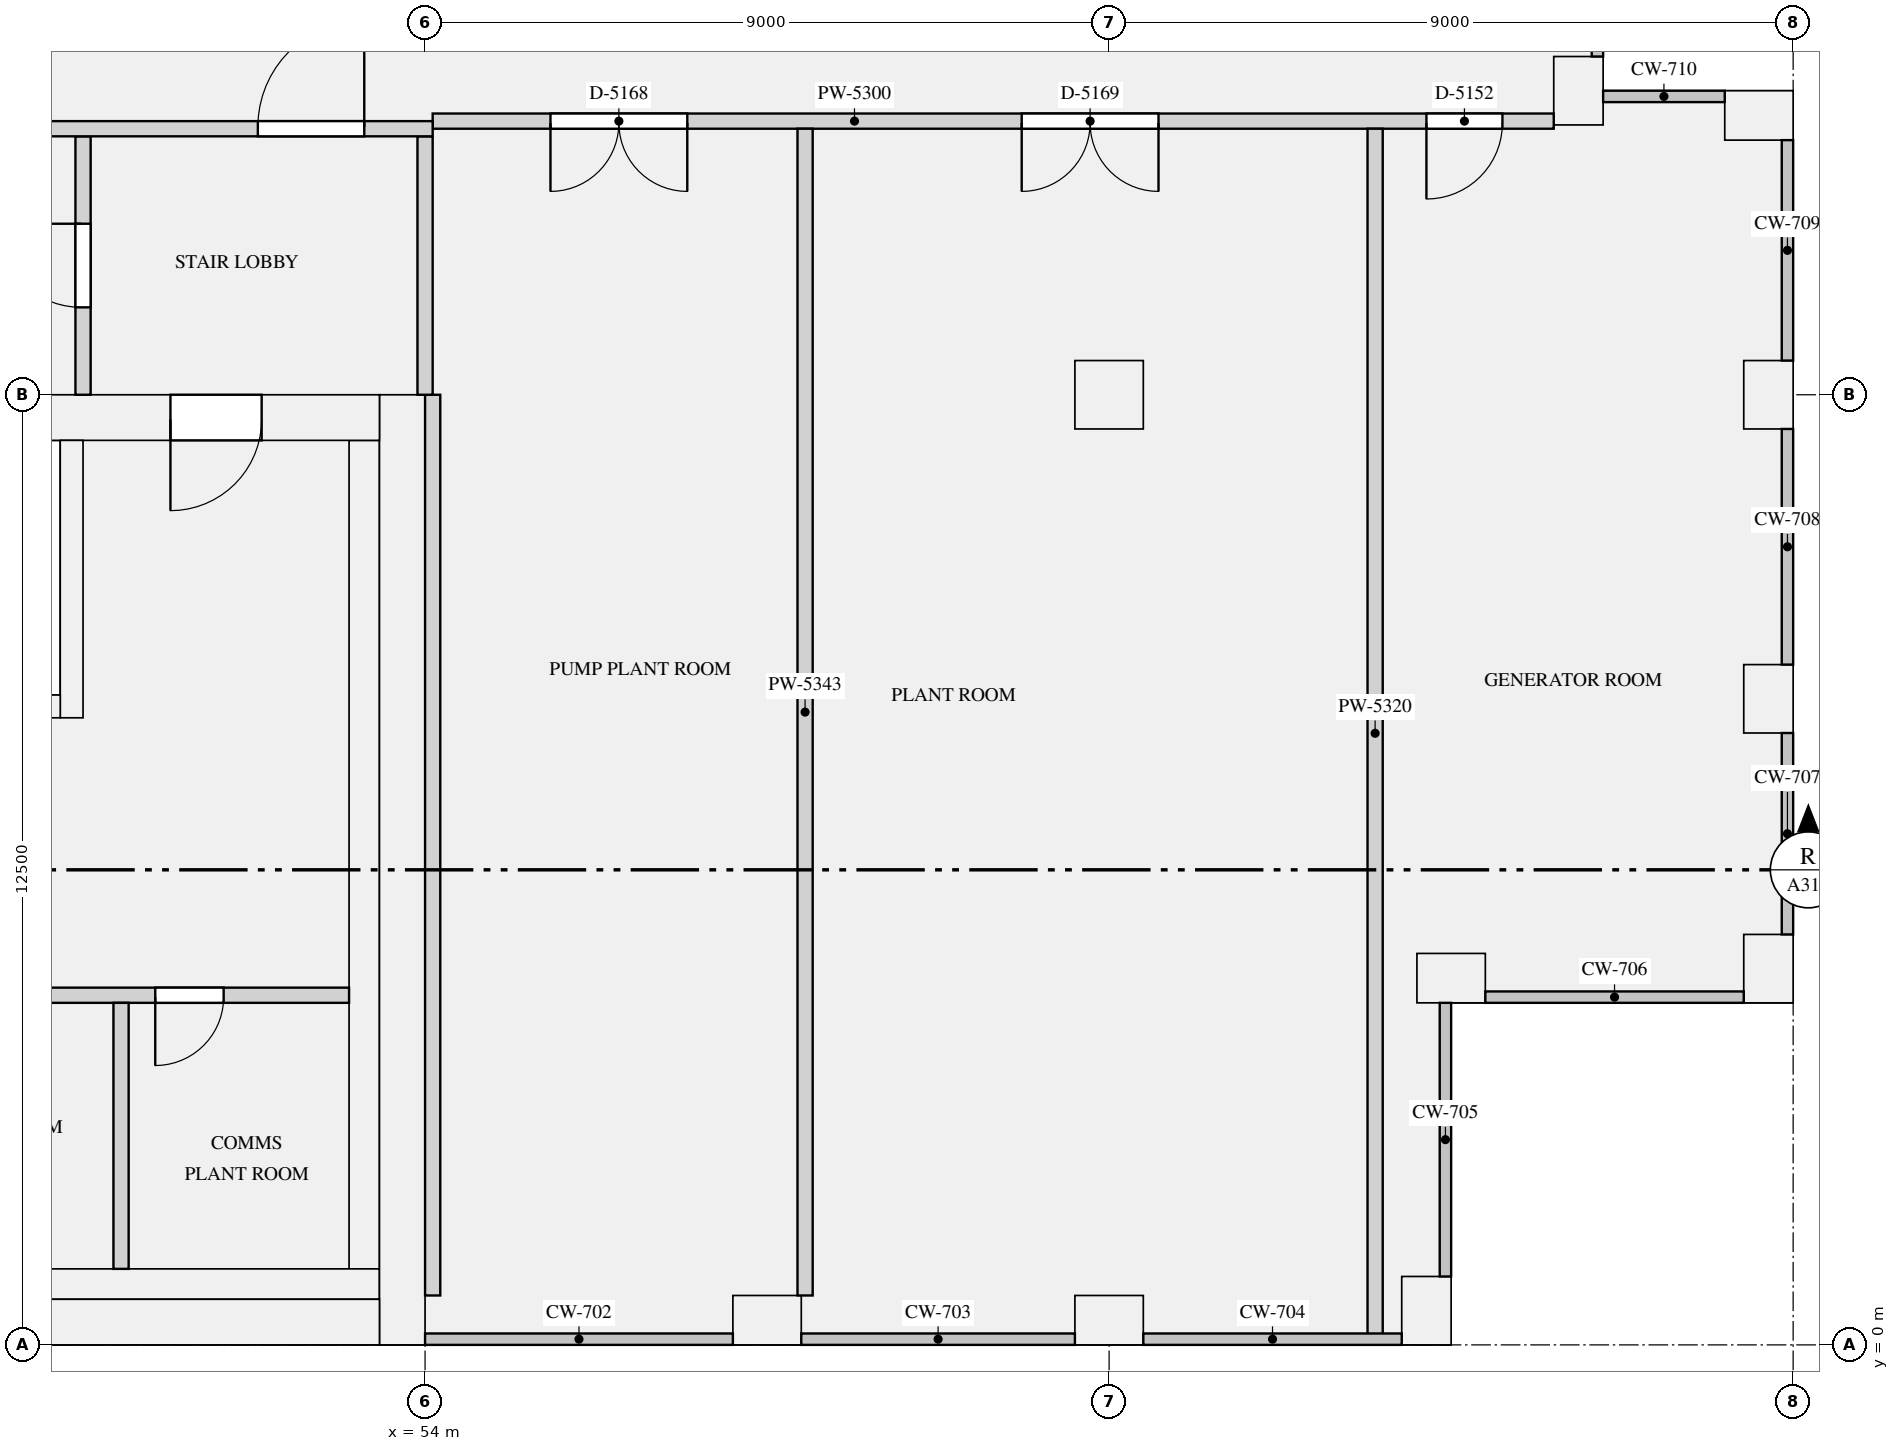
"""IFC4 building model, lengths in metres.
Left out: names, types, materials, properties, quantities, classifications, styles, units other than length and angle.
Written with IfcOpenShell. Run it as: python <this file> out.ifc"""

import sys

from ifc_helpers import new_model, si_unit, direction, frame, frame_2d, origin, origin_2d, place, context, subcontext, project, spatial, rectangle, extrude, element, fill, save


model = new_model("IFC4")
c1 = context("Model", 3, precision=1e-05, world=origin(), true_north=direction((0.0, 1.0)))
c2 = subcontext(c1, "Body", "Model", "MODEL_VIEW")
j1 = project(units=[si_unit("LENGTHUNIT", "METRE"), si_unit("PLANEANGLEUNIT", "RADIAN")], contexts=[c1])
p1 = place(None, origin())
s1 = spatial("IfcSite", under=j1, at=p1, CompositionType="ELEMENT")
p2 = place(p1, origin())
s2 = spatial("IfcBuilding", under=s1, at=p2, CompositionType="ELEMENT")
p3 = place(p2, frame((0.0, 0.0, 240.0)))
s3 = spatial("IfcBuildingStorey", under=s2, at=p3, CompositionType="ELEMENT", Elevation=240.0)
for number, where, z_axis, x_axis in (
    (1, (58.5, 0.325, 0.0), (0.0, 0.0, 1.0), (1.0, 0.0, 0.0)),
    (2, (63.0, 0.325, 0.0), (0.0, 0.0, 1.0), (1.0, 0.0, 0.0)),
    (3, (67.175, 0.45, 0.0), (0.0, 0.0, 1.0), (0.0, 1.0, 0.0)),
    (4, (67.5, 4.825, 0.0), (0.0, 0.0, 1.0), (1.0, 0.0, 0.0)),
    (5, (71.675, 4.95, 0.0), (0.0, 0.0, 1.0), (0.0, 1.0, 0.0)),
    (6, (71.675, 8.5, 0.0), (0.0, 0.0, 1.0), (0.0, 1.0, 0.0)),
    (7, (71.675, 12.5, 0.0), (0.0, 0.0, 1.0), (0.0, 1.0, 0.0)),
    (8, (71.55, 16.175, 0.0), (0.0, 0.0, 1.0), (-1.0, 0.0, 0.0)),
    (9, (69.175, 16.5, 0.0), (0.0, 0.0, 1.0), (0.0, 1.0, 0.0)),
):
    element("IfcColumn", number, at=place(p3, frame(where, z_axis=z_axis, x_axis=x_axis)), inside=s3, PredefinedType="USERDEFINED", context=c2, shape_type="SweptSolid", body=[
        extrude(rectangle(XDim=0.9, YDim=0.65, at=origin_2d()), origin(), (0.0, 0.0, 1.0), 4.2),
    ])
p4 = place(p3, frame((63.0, 12.5, 0.0), z_axis=(0.0, 0.0, 1.0), x_axis=(1.0, 0.0, 0.0)))
e10 = element("IfcColumn", 10, at=p4, inside=s3, PredefinedType="COLUMN", context=c2, shape_type="SweptSolid", body=[
    extrude(rectangle(XDim=0.9, YDim=0.9, at=origin_2d()), origin(), (0.0, 0.0, 1.0), 4.2),
])
p5 = place(p3, frame((53.7, 0.0, 0.0), z_axis=(0.0, 0.0, 1.0), x_axis=(0.0, 1.0, 0.0)))
e11 = element("IfcWall", 11, at=p5, inside=s3, PredefinedType="SHEAR", context=c2, shape_type="SweptSolid", body=[
    extrude(rectangle(XDim=12.5, YDim=0.6, at=frame_2d((6.25, 0.0))), origin(), (0.0, 0.0, 1.0), 4.2),
])
p6 = place(p3, frame((18.6, 0.3, 0.0), z_axis=(0.0, 0.0, 1.0), x_axis=(1.0, 0.0, 0.0)))
e12 = element("IfcWall", 12, at=p6, inside=s3, PredefinedType="SHEAR", context=c2, shape_type="SweptSolid", body=[
    extrude(rectangle(XDim=34.8, YDim=0.6, at=frame_2d((17.4, 0.0))), origin(), (0.0, 0.0, 1.0), 4.2),
])
p7 = place(p3, frame((18.6, 12.2, 0.0), z_axis=(0.0, 0.0, 1.0), x_axis=(1.0, 0.0, 0.0)))
e13 = element("IfcWall", 13, at=p7, inside=s3, PredefinedType="SHEAR", context=c2, shape_type="SweptSolid", body=[
    extrude(rectangle(XDim=34.8, YDim=0.6, at=frame_2d((17.4, 0.0))), origin(), (0.0, 0.0, 1.0), 4.2),
])
p8 = place(p7, frame((24.575, 0.0, 0.0)))
e14 = element("IfcOpeningElement", 14, at=p8, cuts=e13, PredefinedType="OPENING", context=c2, shape_type="SweptSolid", body=[
    extrude(rectangle(XDim=1.1, YDim=2.1, at=frame_2d((0.55, 1.05))), frame((0.0, 0.31, 0.0), z_axis=(0.0, -1.0, 0.0), x_axis=(1.0, 0.0, 0.0)), (0.0, 0.0, 1.0), 0.62),
])
p9 = place(p7, frame((26.825, 0.0, 0.0)))
e15 = element("IfcOpeningElement", 15, at=p9, cuts=e13, PredefinedType="OPENING", context=c2, shape_type="SweptSolid", body=[
    extrude(rectangle(XDim=1.1, YDim=2.1, at=frame_2d((0.55, 1.05))), frame((0.0, 0.31, 0.0), z_axis=(0.0, -1.0, 0.0), x_axis=(1.0, 0.0, 0.0)), (0.0, 0.0, 1.0), 0.62),
])
p10 = place(p7, frame((29.075, 0.0, 0.0)))
e16 = element("IfcOpeningElement", 16, at=p10, cuts=e13, PredefinedType="OPENING", context=c2, shape_type="SweptSolid", body=[
    extrude(rectangle(XDim=1.1, YDim=2.1, at=frame_2d((0.55, 1.05))), frame((0.0, 0.31, 0.0), z_axis=(0.0, -1.0, 0.0), x_axis=(1.0, 0.0, 0.0)), (0.0, 0.0, 1.0), 0.62),
])
p11 = place(p7, frame((18.6, 0.0, 0.0)))
e17 = element("IfcOpeningElement", 17, at=p11, cuts=e13, PredefinedType="OPENING", context=c2, shape_type="SweptSolid", body=[
    extrude(rectangle(XDim=0.9, YDim=2.1, at=frame_2d((0.45, 1.05))), frame((0.0, 0.31, 0.0), z_axis=(0.0, -1.0, 0.0), x_axis=(1.0, 0.0, 0.0)), (0.0, 0.0, 1.0), 0.62),
])
p12 = place(p7, frame((4.65, 0.0, 0.0)))
e18 = element("IfcOpeningElement", 18, at=p12, cuts=e13, PredefinedType="OPENING", context=c2, shape_type="SweptSolid", body=[
    extrude(rectangle(XDim=0.9, YDim=2.1, at=frame_2d((0.45, 1.05))), frame((0.0, 0.31, 0.0), z_axis=(0.0, -1.0, 0.0), x_axis=(1.0, 0.0, 0.0)), (0.0, 0.0, 1.0), 0.62),
])
p13 = place(p7, frame((1.55, 0.0, 0.0)))
e19 = element("IfcOpeningElement", 19, at=p13, cuts=e13, PredefinedType="OPENING", context=c2, shape_type="SweptSolid", body=[
    extrude(rectangle(XDim=1.2, YDim=2.1, at=frame_2d((0.6, 1.05))), frame((0.0, 0.31, 0.0), z_axis=(0.0, -1.0, 0.0), x_axis=(1.0, 0.0, 0.0)), (0.0, 0.0, 1.0), 0.62),
])
p14 = place(p7, frame((32.05, 0.0, 0.0)))
e20 = element("IfcOpeningElement", 20, at=p14, cuts=e13, PredefinedType="OPENING", context=c2, shape_type="SweptSolid", body=[
    extrude(rectangle(XDim=1.2, YDim=2.1, at=frame_2d((0.6, 1.05))), frame((0.0, 0.31, 0.0), z_axis=(0.0, -1.0, 0.0), x_axis=(1.0, 0.0, 0.0)), (0.0, 0.0, 1.0), 0.62),
])
p15 = place(p3, frame((53.2, 1.0, 0.0), z_axis=(0.0, 0.0, 1.0), x_axis=(0.0, 1.0, 0.0)))
e21 = element("IfcWall", 21, at=p15, inside=s3, PredefinedType="SHEAR", context=c2, shape_type="SweptSolid", body=[
    extrude(rectangle(XDim=10.9, YDim=0.4, at=frame_2d((5.45, 0.0))), origin(), (0.0, 0.0, 1.0), 4.2),
])
p16 = place(p3, frame((18.6, 0.8, 0.0), z_axis=(0.0, 0.0, 1.0), x_axis=(1.0, 0.0, 0.0)))
e22 = element("IfcWall", 22, at=p16, inside=s3, PredefinedType="SHEAR", context=c2, shape_type="SweptSolid", body=[
    extrude(rectangle(XDim=34.8, YDim=0.4, at=frame_2d((17.4, 0.0))), origin(), (0.0, 0.0, 1.0), 4.2),
])
p17 = place(p3, frame((47.25, 8.4, 0.0), z_axis=(0.0, 0.0, 1.0), x_axis=(1.0, 0.0, 0.0)))
e23 = element("IfcWall", 23, at=p17, inside=s3, PredefinedType="SHEAR", context=c2, shape_type="SweptSolid", body=[
    extrude(rectangle(XDim=1.95, YDim=0.3, at=frame_2d((0.975, 0.0))), origin(), (0.0, 0.0, 1.0), 4.2),
])
p18 = place(p3, frame((49.35, 8.25, 0.0), z_axis=(0.0, 0.0, 1.0), x_axis=(0.0, 1.0, 0.0)))
e24 = element("IfcWall", 24, at=p18, inside=s3, PredefinedType="SHEAR", context=c2, shape_type="SweptSolid", body=[
    extrude(rectangle(XDim=3.65, YDim=0.3, at=frame_2d((1.825, 0.0))), origin(), (0.0, 0.0, 1.0), 4.2),
])
p19 = place(p3, frame((40.2, 4.6, 0.0), z_axis=(0.0, 0.0, 1.0), x_axis=(1.0, 0.0, 0.0)))
e25 = element("IfcWall", 25, at=p19, inside=s3, PredefinedType="PARTITIONING", context=c2, shape_type="SweptSolid", body=[
    extrude(rectangle(XDim=12.8, YDim=0.2, at=frame_2d((6.4, 0.0))), origin(), (0.0, 0.0, 1.0), 3.85),
])
p20 = place(p19, frame((4.85, 0.0, 0.0)))
e26 = element("IfcOpeningElement", 26, at=p20, cuts=e25, PredefinedType="OPENING", context=c2, shape_type="SweptSolid", body=[
    extrude(rectangle(XDim=0.9, YDim=2.1, at=frame_2d((0.45, 1.05))), frame((0.0, 0.11, 0.0), z_axis=(0.0, -1.0, 0.0), x_axis=(1.0, 0.0, 0.0)), (0.0, 0.0, 1.0), 0.22),
])
p21 = place(p19, frame((10.25, 0.0, 0.0)))
e27 = element("IfcOpeningElement", 27, at=p21, cuts=e25, PredefinedType="OPENING", context=c2, shape_type="SweptSolid", body=[
    extrude(rectangle(XDim=0.9, YDim=2.1, at=frame_2d((0.45, 1.05))), frame((0.0, 0.11, 0.0), z_axis=(0.0, -1.0, 0.0), x_axis=(1.0, 0.0, 0.0)), (0.0, 0.0, 1.0), 0.22),
])
p22 = place(p19, frame((0.65, 0.0, 0.0)))
e28 = element("IfcOpeningElement", 28, at=p22, cuts=e25, PredefinedType="OPENING", context=c2, shape_type="SweptSolid", body=[
    extrude(rectangle(XDim=0.9, YDim=2.1, at=frame_2d((0.45, 1.05))), frame((0.0, 0.11, 0.0), z_axis=(0.0, -1.0, 0.0), x_axis=(1.0, 0.0, 0.0)), (0.0, 0.0, 1.0), 0.22),
])
p23 = place(p19, frame((2.85, 0.0, 0.0)))
e29 = element("IfcOpeningElement", 29, at=p23, cuts=e25, PredefinedType="OPENING", context=c2, shape_type="SweptSolid", body=[
    extrude(rectangle(XDim=0.9, YDim=2.1, at=frame_2d((0.45, 1.05))), frame((0.0, 0.11, 0.0), z_axis=(0.0, -1.0, 0.0), x_axis=(1.0, 0.0, 0.0)), (0.0, 0.0, 1.0), 0.22),
])
p24 = place(p3, frame((50.0, 1.0, 0.0), z_axis=(0.0, 0.0, 1.0), x_axis=(0.0, 1.0, 0.0)))
e30 = element("IfcWall", 30, at=p24, inside=s3, PredefinedType="PARTITIONING", context=c2, shape_type="SweptSolid", body=[
    extrude(rectangle(XDim=3.5, YDim=0.2, at=frame_2d((1.75, 0.0))), origin(), (0.0, 0.0, 1.0), 3.85),
])
p25 = place(p3, frame((49.5, 12.5, 0.0), z_axis=(0.0, 0.0, 1.0), x_axis=(0.0, 1.0, 0.0)))
e31 = element("IfcWall", 31, at=p25, inside=s3, PredefinedType="PARTITIONING", context=c2, shape_type="SweptSolid", body=[
    extrude(rectangle(XDim=3.4, YDim=0.2, at=frame_2d((1.7, 0.0))), origin(), (0.0, 0.0, 1.0), 3.85),
])
p26 = place(p25, frame((1.15, 0.0, 0.0)))
e32 = element("IfcOpeningElement", 32, at=p26, cuts=e31, PredefinedType="OPENING", context=c2, shape_type="SweptSolid", body=[
    extrude(rectangle(XDim=1.1, YDim=2.1, at=frame_2d((0.55, 1.05))), frame((0.0, 0.11, 0.0), z_axis=(0.0, -1.0, 0.0), x_axis=(1.0, 0.0, 0.0)), (0.0, 0.0, 1.0), 0.22),
])
p27 = place(p3, frame((54.0, 12.5, 0.0), z_axis=(0.0, 0.0, 1.0), x_axis=(0.0, 1.0, 0.0)))
e33 = element("IfcWall", 33, at=p27, inside=s3, PredefinedType="PARTITIONING", context=c2, shape_type="SweptSolid", body=[
    extrude(rectangle(XDim=3.4, YDim=0.2, at=frame_2d((1.7, 0.0))), origin(), (0.0, 0.0, 1.0), 3.85),
])
p28 = place(p3, frame((17.9, 16.0, 0.0), z_axis=(0.0, 0.0, 1.0), x_axis=(1.0, 0.0, 0.0)))
e34 = element("IfcWall", 34, at=p28, inside=s3, PredefinedType="PARTITIONING", context=c2, shape_type="SweptSolid", body=[
    extrude(rectangle(XDim=36.2, YDim=0.2, at=frame_2d((18.1, 0.0))), origin(), (0.0, 0.0, 1.0), 3.85),
])
p29 = place(p28, frame((0.9, 0.0, 0.0)))
e35 = element("IfcOpeningElement", 35, at=p29, cuts=e34, PredefinedType="OPENING", context=c2, shape_type="SweptSolid", body=[
    extrude(rectangle(XDim=1.4, YDim=2.1, at=frame_2d((0.7, 1.05))), frame((0.0, 0.11, 0.0), z_axis=(0.0, -1.0, 0.0), x_axis=(1.0, 0.0, 0.0)), (0.0, 0.0, 1.0), 0.22),
])
p30 = place(p28, frame((33.9, 0.0, 0.0)))
e36 = element("IfcOpeningElement", 36, at=p30, cuts=e34, PredefinedType="OPENING", context=c2, shape_type="SweptSolid", body=[
    extrude(rectangle(XDim=1.4, YDim=2.1, at=frame_2d((0.7, 1.05))), frame((0.0, 0.11, 0.0), z_axis=(0.0, -1.0, 0.0), x_axis=(1.0, 0.0, 0.0)), (0.0, 0.0, 1.0), 0.22),
])
p31 = place(p3, frame((54.1, 16.1, 0.0), z_axis=(0.0, 0.0, 1.0), x_axis=(1.0, 0.0, 0.0)))
e37 = element("IfcWall", 37, at=p31, inside=s3, PredefinedType="PARTITIONING", context=c2, shape_type="SweptSolid", body=[
    extrude(rectangle(XDim=14.75, YDim=0.2, at=frame_2d((7.375, 0.0))), origin(), (0.0, 0.0, 1.0), 3.85),
])
p32 = place(p31, frame((1.55, 0.0, 0.0)))
e38 = element("IfcOpeningElement", 38, at=p32, cuts=e37, PredefinedType="OPENING", context=c2, shape_type="SweptSolid", body=[
    extrude(rectangle(XDim=1.8, YDim=2.1, at=frame_2d((0.9, 1.05))), frame((0.0, 0.11, 0.0), z_axis=(0.0, -1.0, 0.0), x_axis=(1.0, 0.0, 0.0)), (0.0, 0.0, 1.0), 0.22),
])
p33 = place(p31, frame((7.75, 0.0, 0.0)))
e39 = element("IfcOpeningElement", 39, at=p33, cuts=e37, PredefinedType="OPENING", context=c2, shape_type="SweptSolid", body=[
    extrude(rectangle(XDim=1.8, YDim=2.1, at=frame_2d((0.9, 1.05))), frame((0.0, 0.11, 0.0), z_axis=(0.0, -1.0, 0.0), x_axis=(1.0, 0.0, 0.0)), (0.0, 0.0, 1.0), 0.22),
])
p34 = place(p31, frame((13.075, 0.0, 0.0)))
e40 = element("IfcOpeningElement", 40, at=p34, cuts=e37, PredefinedType="OPENING", context=c2, shape_type="SweptSolid", body=[
    extrude(rectangle(XDim=1.0, YDim=2.1, at=frame_2d((0.5, 1.05))), frame((0.0, 0.11, 0.0), z_axis=(0.0, -1.0, 0.0), x_axis=(1.0, 0.0, 0.0)), (0.0, 0.0, 1.0), 0.22),
])
p35 = place(p3, frame((54.1, 0.65, 0.0), z_axis=(0.0, 0.0, 1.0), x_axis=(0.0, 1.0, 0.0)))
e41 = element("IfcWall", 41, at=p35, inside=s3, PredefinedType="PARTITIONING", context=c2, shape_type="SweptSolid", body=[
    extrude(rectangle(XDim=11.85, YDim=0.2, at=frame_2d((5.925, 0.0))), origin(), (0.0, 0.0, 1.0), 3.85),
])
p36 = place(p3, frame((59.0, 0.65, 0.0), z_axis=(0.0, 0.0, 1.0), x_axis=(0.0, 1.0, 0.0)))
e42 = element("IfcWall", 42, at=p36, inside=s3, PredefinedType="PARTITIONING", context=c2, shape_type="SweptSolid", body=[
    extrude(rectangle(XDim=15.35, YDim=0.2, at=frame_2d((7.675, 0.0))), origin(), (0.0, 0.0, 1.0), 3.85),
])
p37 = place(p3, frame((66.5, 0.093, 0.0), z_axis=(0.0, 0.0, 1.0), x_axis=(0.0, 1.0, 0.0)))
e43 = element("IfcWall", 43, at=p37, inside=s3, PredefinedType="PARTITIONING", context=c2, shape_type="SweptSolid", body=[
    extrude(rectangle(XDim=15.907, YDim=0.2, at=frame_2d((7.954, 0.0))), origin(), (0.0, 0.0, 1.0), 3.85),
])
p38 = place(p21, frame((0.9, 0.0, 0.0), z_axis=(0.0, 0.0, 1.0), x_axis=(-1.0, 0.0, 0.0)))
e44 = element("IfcDoor", 44, at=p38, inside=s3, OperationType="SINGLE_SWING_RIGHT", PredefinedType="DOOR", context=c2, shape_type="SweptSolid", body=[
    extrude(rectangle(XDim=0.9, YDim=2.1, at=frame_2d((0.45, 1.05))), frame((0.0, 0.025, 0.0), z_axis=(0.0, -1.0, 0.0), x_axis=(1.0, 0.0, 0.0)), (0.0, 0.0, 1.0), 0.05),
])
fill(e27, e44)
p39 = place(p14, frame((1.2, 0.0, 0.0), z_axis=(0.0, 0.0, 1.0), x_axis=(-1.0, 0.0, 0.0)))
e45 = element("IfcDoor", 45, at=p39, inside=s3, OperationType="SINGLE_SWING_RIGHT", PredefinedType="DOOR", context=c2, shape_type="SweptSolid", body=[
    extrude(rectangle(XDim=1.2, YDim=2.1, at=frame_2d((0.6, 1.05))), frame((0.0, 0.025, 0.0), z_axis=(0.0, -1.0, 0.0), x_axis=(1.0, 0.0, 0.0)), (0.0, 0.0, 1.0), 0.05),
])
fill(e20, e45)
p40 = place(p26, origin())
e46 = element("IfcDoor", 46, at=p40, inside=s3, OperationType="SINGLE_SWING_RIGHT", PredefinedType="DOOR", context=c2, shape_type="SweptSolid", body=[
    extrude(rectangle(XDim=1.1, YDim=2.1, at=frame_2d((0.55, 1.05))), frame((0.0, 0.025, 0.0), z_axis=(0.0, -1.0, 0.0), x_axis=(1.0, 0.0, 0.0)), (0.0, 0.0, 1.0), 0.05),
])
fill(e32, e46)
p41 = place(p30, origin())
e47 = element("IfcDoor", 47, at=p41, inside=s3, OperationType="SINGLE_SWING_RIGHT", PredefinedType="DOOR", context=c2, shape_type="SweptSolid", body=[
    extrude(rectangle(XDim=1.4, YDim=2.1, at=frame_2d((0.7, 1.05))), frame((0.0, 0.025, 0.0), z_axis=(0.0, -1.0, 0.0), x_axis=(1.0, 0.0, 0.0)), (0.0, 0.0, 1.0), 0.05),
])
fill(e36, e47)
p42 = place(p32, frame((1.8, 0.0, 0.0), z_axis=(0.0, 0.0, 1.0), x_axis=(-1.0, 0.0, 0.0)))
e48 = element("IfcDoor", 48, at=p42, inside=s3, OperationType="DOUBLE_DOOR_SINGLE_SWING", PredefinedType="DOOR", context=c2, shape_type="SweptSolid", body=[
    extrude(rectangle(XDim=1.8, YDim=2.1, at=frame_2d((0.9, 1.05))), frame((0.0, 0.025, 0.0), z_axis=(0.0, -1.0, 0.0), x_axis=(1.0, 0.0, 0.0)), (0.0, 0.0, 1.0), 0.05),
])
fill(e38, e48)
p43 = place(p33, frame((1.8, 0.0, 0.0), z_axis=(0.0, 0.0, 1.0), x_axis=(-1.0, 0.0, 0.0)))
e49 = element("IfcDoor", 49, at=p43, inside=s3, OperationType="DOUBLE_DOOR_SINGLE_SWING", PredefinedType="DOOR", context=c2, shape_type="SweptSolid", body=[
    extrude(rectangle(XDim=1.8, YDim=2.1, at=frame_2d((0.9, 1.05))), frame((0.0, 0.025, 0.0), z_axis=(0.0, -1.0, 0.0), x_axis=(1.0, 0.0, 0.0)), (0.0, 0.0, 1.0), 0.05),
])
fill(e39, e49)
p44 = place(p34, frame((1.0, 0.0, 0.0), z_axis=(0.0, 0.0, 1.0), x_axis=(-1.0, 0.0, 0.0)))
e50 = element("IfcDoor", 50, at=p44, inside=s3, OperationType="SINGLE_SWING_RIGHT", PredefinedType="DOOR", context=c2, shape_type="SweptSolid", body=[
    extrude(rectangle(XDim=1.0, YDim=2.1, at=frame_2d((0.5, 1.05))), frame((0.0, 0.025, 0.0), z_axis=(0.0, -1.0, 0.0), x_axis=(1.0, 0.0, 0.0)), (0.0, 0.0, 1.0), 0.05),
])
fill(e40, e50)
save(model, sys.argv[1])
